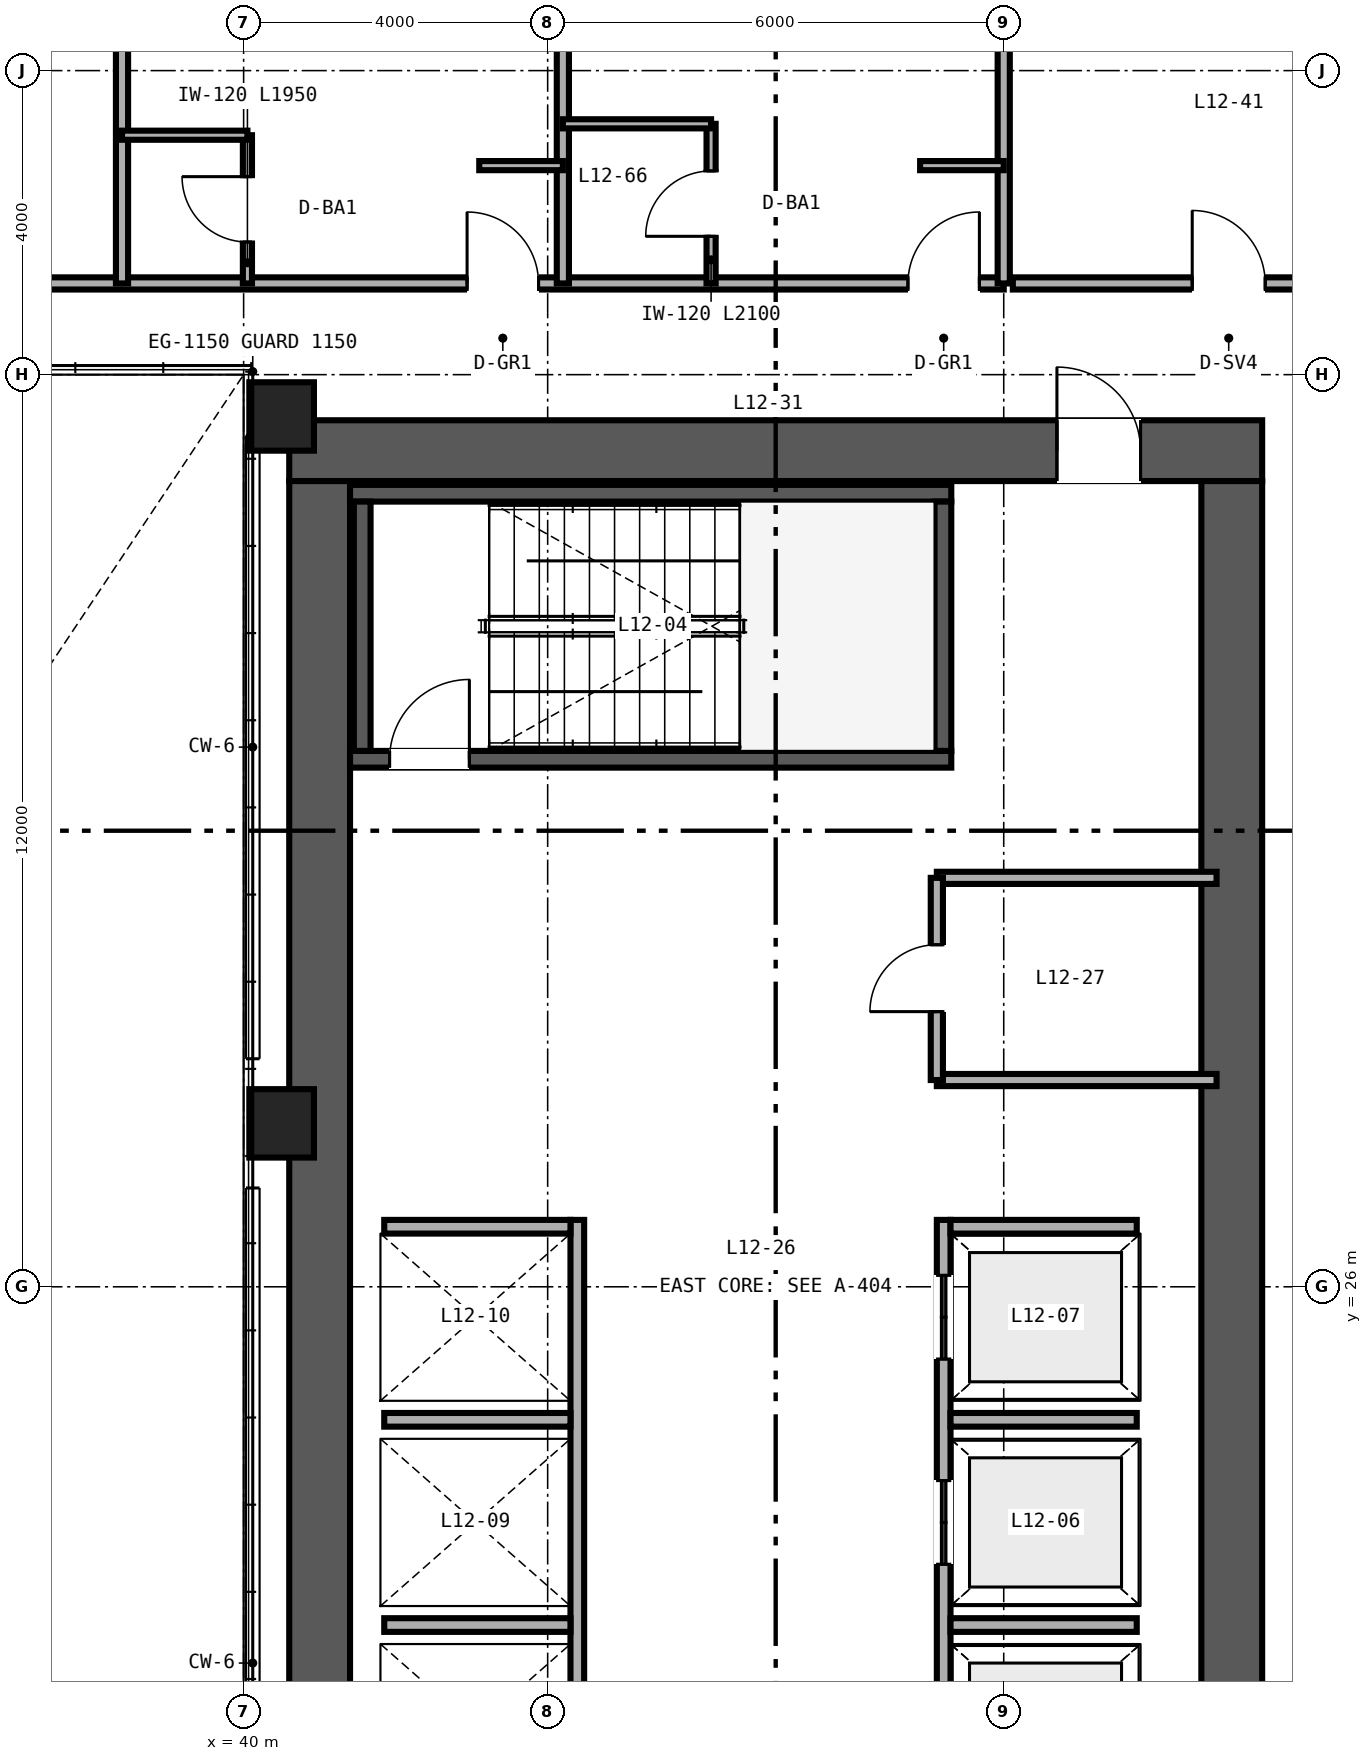
"""IFC4 building model, lengths in metres.
Left out: names, types, materials, properties, quantities, classifications, styles, units other than length and angle.
Written with IfcOpenShell. Run it as: python <this file> out.ifc"""

import sys

from ifc_helpers import new_model, si_unit, direction, frame, frame_2d, origin, origin_2d, place, context, subcontext, project, spatial, rectangle, hollow_rectangle, extrude, source, transform, mapped, element, fill, save


model = new_model("IFC4")
c1 = context("Model", 3, precision=1e-05, world=origin(), true_north=direction((0.0, 1.0)))
c2 = subcontext(c1, "Body", "Model", "MODEL_VIEW")
j1 = project(units=[si_unit("LENGTHUNIT", "METRE"), si_unit("PLANEANGLEUNIT", "RADIAN")], contexts=[c1])
p1 = place(None, origin())
s1 = spatial("IfcSite", under=j1, at=p1, CompositionType="ELEMENT")
p2 = place(p1, origin())
s2 = spatial("IfcBuilding", under=s1, at=p2, CompositionType="ELEMENT")
p3 = place(p2, frame((0.0, 0.0, 52.8)))
s3 = spatial("IfcBuildingStorey", under=s2, at=p3, CompositionType="ELEMENT", Elevation=52.8)
p4 = place(p3, frame((40.6, 37.0, 0.0), z_axis=(0.0, 0.0, 1.0), x_axis=(1.0, 0.0, 0.0)))
e1 = element("IfcWall", 1, at=p4, inside=s3, PredefinedType="SHEAR", context=c2, shape_type="SweptSolid", body=[
    extrude(rectangle(XDim=12.8, YDim=0.8, at=frame_2d((6.4, 0.0))), origin(), (0.0, 0.0, 1.0), 3.35),
])
p5 = place(p4, frame((10.1, 0.0, 0.0)))
e2 = element("IfcOpeningElement", 2, at=p5, cuts=e1, PredefinedType="OPENING", context=c2, shape_type="SweptSolid", body=[
    extrude(rectangle(XDim=1.1, YDim=2.15, at=frame_2d((0.55, 1.075))), frame((0.0, 0.41, 0.0), z_axis=(0.0, -1.0, 0.0), x_axis=(1.0, 0.0, 0.0)), (0.0, 0.0, 1.0), 0.82),
])
for number, where, z_axis, x_axis in (
    (3, (41.0, 15.4, 0.0), (0.0, 0.0, 1.0), (0.0, 1.0, 0.0)),
    (4, (53.0, 15.4, 0.0), (0.0, 0.0, 1.0), (0.0, 1.0, 0.0)),
):
    element("IfcWall", number, at=place(p3, frame(where, z_axis=z_axis, x_axis=x_axis)), inside=s3, PredefinedType="SHEAR", context=c2, shape_type="SweptSolid", body=[
        extrude(rectangle(XDim=21.2, YDim=0.8, at=frame_2d((10.6, 0.0))), origin(), (0.0, 0.0, 1.0), 3.35),
    ])
p6 = place(p3, frame((41.4, 32.94, 0.0), z_axis=(0.0, 0.0, 1.0), x_axis=(1.0, 0.0, 0.0)))
e5 = element("IfcWall", 5, at=p6, inside=s3, PredefinedType="SHEAR", context=c2, shape_type="SweptSolid", body=[
    extrude(rectangle(XDim=7.91, YDim=0.22, at=frame_2d((3.955, 0.0))), origin(), (0.0, 0.0, 1.0), 3.4),
])
p7 = place(p6, frame((0.52, 0.0, 0.0)))
e6 = element("IfcOpeningElement", 6, at=p7, cuts=e5, PredefinedType="OPENING", context=c2, shape_type="SweptSolid", body=[
    extrude(rectangle(XDim=1.05, YDim=2.15, at=frame_2d((0.525, 1.075))), frame((0.0, 0.12, 0.0), z_axis=(0.0, -1.0, 0.0), x_axis=(1.0, 0.0, 0.0)), (0.0, 0.0, 1.0), 0.24),
])
p8 = place(p3, frame((41.4, 36.44, 0.0), z_axis=(0.0, 0.0, 1.0), x_axis=(1.0, 0.0, 0.0)))
e7 = element("IfcWall", 7, at=p8, inside=s3, PredefinedType="SHEAR", context=c2, shape_type="SweptSolid", body=[
    extrude(rectangle(XDim=7.91, YDim=0.22, at=frame_2d((3.955, 0.0))), origin(), (0.0, 0.0, 1.0), 3.4),
])
for number, where, z_axis, x_axis in (
    (8, (41.56, 33.05, 0.0), (0.0, 0.0, 1.0), (0.0, 1.0, 0.0)),
    (9, (49.2, 33.05, 0.0), (0.0, 0.0, 1.0), (0.0, 1.0, 0.0)),
):
    element("IfcWall", number, at=place(p3, frame(where, z_axis=z_axis, x_axis=x_axis)), inside=s3, PredefinedType="SHEAR", context=c2, shape_type="SweptSolid", body=[
        extrude(rectangle(XDim=3.28, YDim=0.22, at=frame_2d((1.64, 0.0))), origin(), (0.0, 0.0, 1.0), 3.4),
    ])
m1 = source(origin(), c2, "Body", "SweptSolid", [
    extrude(hollow_rectangle(XDim=0.85, YDim=0.9, WallThickness=0.04, at=origin_2d()), origin(), (0.0, 0.0, 1.0), 3.35),
])
for number, where, z_axis, x_axis in (
    (10, (40.5, 28.15, 0.0), (0.0, 0.0, 1.0), (1.0, 0.0, 0.0)),
    (11, (40.5, 37.45, 0.0), (0.0, 0.0, 1.0), (1.0, 0.0, 0.0)),
):
    element("IfcColumn", number, at=place(p3, frame(where, z_axis=z_axis, x_axis=x_axis)), inside=s3, PredefinedType="COLUMN", context=c2, shape_type="MappedRepresentation", body=[
        mapped(m1, transform((0.0, 0.0, 0.0), scale=1.0)),
    ])
p9 = place(p3, frame((49.21, 18.92, 0.0), z_axis=(0.0, 0.0, 1.0), x_axis=(0.0, 1.0, 0.0)))
e12 = element("IfcWall", 12, at=p9, inside=s3, PredefinedType="SOLIDWALL", context=c2, shape_type="SweptSolid", body=[
    extrude(rectangle(XDim=7.96, YDim=0.18, at=frame_2d((3.98, 0.0))), origin(), (0.0, 0.0, 1.0), 3.35),
])
p10 = place(p9, frame((0.73, 0.0, 0.0)))
e13 = element("IfcOpeningElement", 13, at=p10, cuts=e12, PredefinedType="OPENING", context=c2, shape_type="SweptSolid", body=[
    extrude(rectangle(XDim=1.1, YDim=2.2, at=frame_2d((0.55, 1.1))), frame((0.0, 0.1, 0.0), z_axis=(0.0, -1.0, 0.0), x_axis=(1.0, 0.0, 0.0)), (0.0, 0.0, 1.0), 0.2),
])
p11 = place(p9, frame((3.43, 0.0, 0.0)))
e14 = element("IfcOpeningElement", 14, at=p11, cuts=e12, PredefinedType="OPENING", context=c2, shape_type="SweptSolid", body=[
    extrude(rectangle(XDim=1.1, YDim=2.2, at=frame_2d((0.55, 1.1))), frame((0.0, 0.1, 0.0), z_axis=(0.0, -1.0, 0.0), x_axis=(1.0, 0.0, 0.0)), (0.0, 0.0, 1.0), 0.2),
])
p12 = place(p9, frame((6.13, 0.0, 0.0)))
e15 = element("IfcOpeningElement", 15, at=p12, cuts=e12, PredefinedType="OPENING", context=c2, shape_type="SweptSolid", body=[
    extrude(rectangle(XDim=1.1, YDim=2.2, at=frame_2d((0.55, 1.1))), frame((0.0, 0.1, 0.0), z_axis=(0.0, -1.0, 0.0), x_axis=(1.0, 0.0, 0.0)), (0.0, 0.0, 1.0), 0.2),
])
for number, where, z_axis, x_axis in (
    (16, (49.3, 26.79, 0.0), (0.0, 0.0, 1.0), (1.0, 0.0, 0.0)),
    (17, (49.3, 21.55, 0.0), (0.0, 0.0, 1.0), (1.0, 0.0, 0.0)),
    (18, (49.3, 24.25, 0.0), (0.0, 0.0, 1.0), (1.0, 0.0, 0.0)),
):
    element("IfcWall", number, at=place(p3, frame(where, z_axis=z_axis, x_axis=x_axis)), inside=s3, PredefinedType="SOLIDWALL", context=c2, shape_type="SweptSolid", body=[
        extrude(rectangle(XDim=2.45, YDim=0.18, at=frame_2d((1.225, 0.0))), origin(), (0.0, 0.0, 1.0), 3.35),
    ])
p13 = place(p3, frame((44.39, 18.92, 0.0), z_axis=(0.0, 0.0, 1.0), x_axis=(0.0, 1.0, 0.0)))
e19 = element("IfcWall", 19, at=p13, inside=s3, PredefinedType="SOLIDWALL", context=c2, shape_type="SweptSolid", body=[
    extrude(rectangle(XDim=7.96, YDim=0.18, at=frame_2d((3.98, 0.0))), origin(), (0.0, 0.0, 1.0), 3.35),
])
for number, where, z_axis, x_axis in (
    (20, (41.85, 26.79, 0.0), (0.0, 0.0, 1.0), (1.0, 0.0, 0.0)),
    (21, (41.85, 21.55, 0.0), (0.0, 0.0, 1.0), (1.0, 0.0, 0.0)),
    (22, (41.85, 24.25, 0.0), (0.0, 0.0, 1.0), (1.0, 0.0, 0.0)),
):
    element("IfcWall", number, at=place(p3, frame(where, z_axis=z_axis, x_axis=x_axis)), inside=s3, PredefinedType="SOLIDWALL", context=c2, shape_type="SweptSolid", body=[
        extrude(rectangle(XDim=2.45, YDim=0.18, at=frame_2d((1.225, 0.0))), origin(), (0.0, 0.0, 1.0), 3.35),
    ])
p14 = place(p3, frame((49.12, 28.72, 0.0), z_axis=(0.0, 0.0, 1.0), x_axis=(1.0, 0.0, 0.0)))
e23 = element("IfcWall", 23, at=p14, inside=s3, PredefinedType="PARTITIONING", context=c2, shape_type="SweptSolid", body=[
    extrude(rectangle(XDim=3.68, YDim=0.16, at=frame_2d((1.84, 0.0))), origin(), (0.0, 0.0, 1.0), 3.35),
])
p15 = place(p3, frame((49.12, 31.38, 0.0), z_axis=(0.0, 0.0, 1.0), x_axis=(1.0, 0.0, 0.0)))
e24 = element("IfcWall", 24, at=p15, inside=s3, PredefinedType="PARTITIONING", context=c2, shape_type="SweptSolid", body=[
    extrude(rectangle(XDim=3.68, YDim=0.16, at=frame_2d((1.84, 0.0))), origin(), (0.0, 0.0, 1.0), 2.36),
])
p16 = place(p3, frame((49.12, 28.72, 0.0), z_axis=(0.0, 0.0, 1.0), x_axis=(0.0, 1.0, 0.0)))
e25 = element("IfcWall", 25, at=p16, inside=s3, PredefinedType="PARTITIONING", context=c2, shape_type="SweptSolid", body=[
    extrude(rectangle(XDim=2.66, YDim=0.16, at=frame_2d((1.33, 0.0))), origin(), (0.0, 0.0, 1.0), 2.36),
])
p17 = place(p16, frame((0.9, 0.0, 0.0)))
e26 = element("IfcOpeningElement", 26, at=p17, cuts=e25, PredefinedType="OPENING", context=c2, shape_type="SweptSolid", body=[
    extrude(rectangle(XDim=0.88, YDim=2.15, at=frame_2d((0.44, 1.075))), frame((0.0, 0.09, 0.0), z_axis=(0.0, -1.0, 0.0), x_axis=(1.0, 0.0, 0.0)), (0.0, 0.0, 1.0), 0.18),
])
p18 = place(p3, frame((50.12, 39.2, 0.0), z_axis=(0.0, 0.0, 1.0), x_axis=(1.0, 0.0, 0.0)))
e27 = element("IfcWall", 27, at=p18, inside=s3, PredefinedType="PARTITIONING", context=c2, shape_type="SweptSolid", body=[
    extrude(rectangle(XDim=5.68, YDim=0.16, at=frame_2d((2.84, 0.0))), origin(), (0.0, 0.0, 1.0), 3.35),
])
p19 = place(p18, frame((2.36, 0.0, 0.0)))
e28 = element("IfcOpeningElement", 28, at=p19, cuts=e27, PredefinedType="OPENING", context=c2, shape_type="SweptSolid", body=[
    extrude(rectangle(XDim=0.96, YDim=2.15, at=frame_2d((0.48, 1.075))), frame((0.0, 0.09, 0.0), z_axis=(0.0, -1.0, 0.0), x_axis=(1.0, 0.0, 0.0)), (0.0, 0.0, 1.0), 0.18),
])
p20 = place(p3, frame((14.0, 39.2, 0.0), z_axis=(0.0, 0.0, 1.0), x_axis=(1.0, 0.0, 0.0)))
e29 = element("IfcWall", 29, at=p20, inside=s3, PredefinedType="PARTITIONING", context=c2, shape_type="SweptSolid", body=[
    extrude(rectangle(XDim=36.0, YDim=0.16, at=frame_2d((18.0, 0.0))), origin(), (0.0, 0.0, 1.0), 2.571),
])
p21 = place(p20, frame((4.54, 0.0, 0.0)))
e30 = element("IfcOpeningElement", 30, at=p21, cuts=e29, PredefinedType="OPENING", context=c2, shape_type="SweptSolid", body=[
    extrude(rectangle(XDim=0.94, YDim=2.15, at=frame_2d((0.47, 1.075))), frame((0.0, 0.09, 0.0), z_axis=(0.0, -1.0, 0.0), x_axis=(1.0, 0.0, 0.0)), (0.0, 0.0, 1.0), 0.18),
])
p22 = place(p20, frame((10.29, 0.0, 0.0)))
e31 = element("IfcOpeningElement", 31, at=p22, cuts=e29, PredefinedType="OPENING", context=c2, shape_type="SweptSolid", body=[
    extrude(rectangle(XDim=0.94, YDim=2.15, at=frame_2d((0.47, 1.075))), frame((0.0, 0.09, 0.0), z_axis=(0.0, -1.0, 0.0), x_axis=(1.0, 0.0, 0.0)), (0.0, 0.0, 1.0), 0.18),
])
p23 = place(p20, frame((16.54, 0.0, 0.0)))
e32 = element("IfcOpeningElement", 32, at=p23, cuts=e29, PredefinedType="OPENING", context=c2, shape_type="SweptSolid", body=[
    extrude(rectangle(XDim=0.94, YDim=2.15, at=frame_2d((0.47, 1.075))), frame((0.0, 0.09, 0.0), z_axis=(0.0, -1.0, 0.0), x_axis=(1.0, 0.0, 0.0)), (0.0, 0.0, 1.0), 0.18),
])
p24 = place(p20, frame((20.62, 0.0, 0.0)))
e33 = element("IfcOpeningElement", 33, at=p24, cuts=e29, PredefinedType="OPENING", context=c2, shape_type="SweptSolid", body=[
    extrude(rectangle(XDim=0.96, YDim=2.15, at=frame_2d((0.48, 1.075))), frame((0.0, 0.09, 0.0), z_axis=(0.0, -1.0, 0.0), x_axis=(1.0, 0.0, 0.0)), (0.0, 0.0, 1.0), 0.18),
])
p25 = place(p20, frame((28.94, 0.0, 0.0)))
e34 = element("IfcOpeningElement", 34, at=p25, cuts=e29, PredefinedType="OPENING", context=c2, shape_type="SweptSolid", body=[
    extrude(rectangle(XDim=0.94, YDim=2.15, at=frame_2d((0.47, 1.075))), frame((0.0, 0.09, 0.0), z_axis=(0.0, -1.0, 0.0), x_axis=(1.0, 0.0, 0.0)), (0.0, 0.0, 1.0), 0.18),
])
p26 = place(p20, frame((34.74, 0.0, 0.0)))
e35 = element("IfcOpeningElement", 35, at=p26, cuts=e29, PredefinedType="OPENING", context=c2, shape_type="SweptSolid", body=[
    extrude(rectangle(XDim=0.94, YDim=2.15, at=frame_2d((0.47, 1.075))), frame((0.0, 0.09, 0.0), z_axis=(0.0, -1.0, 0.0), x_axis=(1.0, 0.0, 0.0)), (0.0, 0.0, 1.0), 0.18),
])
p27 = place(p3, frame((50.0, 39.2, 0.0), z_axis=(0.0, 0.0, 1.0), x_axis=(0.0, 1.0, 0.0)))
e36 = element("IfcWall", 36, at=p27, inside=s3, PredefinedType="PARTITIONING", context=c2, shape_type="SweptSolid", body=[
    extrude(rectangle(XDim=10.44, YDim=0.16, at=frame_2d((5.22, 0.0))), origin(), (0.0, 0.0, 1.0), 2.657),
])
p28 = place(p3, frame((38.4, 39.2, 0.0), z_axis=(0.0, 0.0, 1.0), x_axis=(0.0, 1.0, 0.0)))
e37 = element("IfcWall", 37, at=p28, inside=s3, PredefinedType="PARTITIONING", context=c2, shape_type="SweptSolid", body=[
    extrude(rectangle(XDim=10.44, YDim=0.16, at=frame_2d((5.22, 0.0))), origin(), (0.0, 0.0, 1.0), 2.423),
])
p29 = place(p3, frame((44.2, 39.2, 0.0), z_axis=(0.0, 0.0, 1.0), x_axis=(0.0, 1.0, 0.0)))
e38 = element("IfcWall", 38, at=p29, inside=s3, PredefinedType="PARTITIONING", context=c2, shape_type="SweptSolid", body=[
    extrude(rectangle(XDim=10.44, YDim=0.16, at=frame_2d((5.22, 0.0))), origin(), (0.0, 0.0, 1.0), 2.657),
])
p30 = place(p3, frame((40.05, 39.2, 0.0), z_axis=(0.0, 0.0, 1.0), x_axis=(0.0, 1.0, 0.0)))
e39 = element("IfcWall", 39, at=p30, inside=s3, PredefinedType="PARTITIONING", context=c2, shape_type="SweptSolid", body=[
    extrude(rectangle(XDim=1.95, YDim=0.12, at=frame_2d((0.975, 0.0))), origin(), (0.0, 0.0, 1.0), 3.35),
])
p31 = place(p30, frame((0.545, 0.0, 0.0)))
e40 = element("IfcOpeningElement", 40, at=p31, cuts=e39, PredefinedType="OPENING", context=c2, shape_type="SweptSolid", body=[
    extrude(rectangle(XDim=0.86, YDim=2.1, at=frame_2d((0.43, 1.05))), frame((0.0, 0.07, 0.0), z_axis=(0.0, -1.0, 0.0), x_axis=(1.0, 0.0, 0.0)), (0.0, 0.0, 1.0), 0.14),
])
p32 = place(p3, frame((38.4, 41.15, 0.0), z_axis=(0.0, 0.0, 1.0), x_axis=(1.0, 0.0, 0.0)))
e41 = element("IfcWall", 41, at=p32, inside=s3, PredefinedType="PARTITIONING", context=c2, shape_type="SweptSolid", body=[
    extrude(rectangle(XDim=1.65, YDim=0.12, at=frame_2d((0.825, 0.0))), origin(), (0.0, 0.0, 1.0), 3.35),
])
p33 = place(p3, frame((43.1, 40.75, 0.0), z_axis=(0.0, 0.0, 1.0), x_axis=(1.0, 0.0, 0.0)))
e42 = element("IfcWall", 42, at=p33, inside=s3, PredefinedType="PARTITIONING", context=c2, shape_type="SweptSolid", body=[
    extrude(rectangle(XDim=1.1, YDim=0.12, at=frame_2d((0.55, 0.0))), origin(), (0.0, 0.0, 1.0), 3.35),
])
p34 = place(p3, frame((46.15, 39.2, 0.0), z_axis=(0.0, 0.0, 1.0), x_axis=(0.0, 1.0, 0.0)))
e43 = element("IfcWall", 43, at=p34, inside=s3, PredefinedType="PARTITIONING", context=c2, shape_type="SweptSolid", body=[
    extrude(rectangle(XDim=2.1, YDim=0.12, at=frame_2d((1.05, 0.0))), origin(), (0.0, 0.0, 1.0), 3.35),
])
p35 = place(p34, frame((0.62, 0.0, 0.0)))
e44 = element("IfcOpeningElement", 44, at=p35, cuts=e43, PredefinedType="OPENING", context=c2, shape_type="SweptSolid", body=[
    extrude(rectangle(XDim=0.86, YDim=2.1, at=frame_2d((0.43, 1.05))), frame((0.0, 0.07, 0.0), z_axis=(0.0, -1.0, 0.0), x_axis=(1.0, 0.0, 0.0)), (0.0, 0.0, 1.0), 0.14),
])
p36 = place(p3, frame((44.2, 41.3, 0.0), z_axis=(0.0, 0.0, 1.0), x_axis=(1.0, 0.0, 0.0)))
e45 = element("IfcWall", 45, at=p36, inside=s3, PredefinedType="PARTITIONING", context=c2, shape_type="SweptSolid", body=[
    extrude(rectangle(XDim=1.95, YDim=0.12, at=frame_2d((0.975, 0.0))), origin(), (0.0, 0.0, 1.0), 3.35),
])
p37 = place(p3, frame((48.9, 40.75, 0.0), z_axis=(0.0, 0.0, 1.0), x_axis=(1.0, 0.0, 0.0)))
e46 = element("IfcWall", 46, at=p37, inside=s3, PredefinedType="PARTITIONING", context=c2, shape_type="SweptSolid", body=[
    extrude(rectangle(XDim=1.1, YDim=0.12, at=frame_2d((0.55, 0.0))), origin(), (0.0, 0.0, 1.0), 3.35),
])
m2 = source(origin(), c2, "Body", "SweptSolid", [
    extrude(rectangle(XDim=1.05, YDim=2.15, at=frame_2d((0.525, 1.075))), frame((0.0, 0.025, 0.0), z_axis=(0.0, -1.0, 0.0), x_axis=(1.0, 0.0, 0.0)), (0.0, 0.0, 1.0), 0.05),
])
p38 = place(p7, origin())
e47 = element("IfcDoor", 47, at=p38, inside=s3, OperationType="SINGLE_SWING_RIGHT", PredefinedType="DOOR", context=c2, shape_type="MappedRepresentation", body=[
    mapped(m2, transform((0.0, 0.0, 0.0), scale=1.0)),
])
fill(e6, e47)
m3 = source(origin(), c2, "Body", "SweptSolid", [
    extrude(rectangle(XDim=1.1, YDim=2.2, at=frame_2d((0.55, 1.1))), frame((0.0, 0.025, 0.0), z_axis=(0.0, -1.0, 0.0), x_axis=(1.0, 0.0, 0.0)), (0.0, 0.0, 1.0), 0.05),
])
p39 = place(p11, origin())
e48 = element("IfcDoor", 48, at=p39, inside=s3, OperationType="DOUBLE_DOOR_SLIDING", PredefinedType="DOOR", context=c2, shape_type="MappedRepresentation", body=[
    mapped(m3, transform((0.0, 0.0, 0.0), scale=1.0)),
])
fill(e14, e48)
p40 = place(p12, origin())
e49 = element("IfcDoor", 49, at=p40, inside=s3, OperationType="DOUBLE_DOOR_SLIDING", PredefinedType="DOOR", context=c2, shape_type="MappedRepresentation", body=[
    mapped(m3, transform((0.0, 0.0, 0.0), scale=1.0)),
])
fill(e15, e49)
m4 = source(origin(), c2, "Body", "SweptSolid", [
    extrude(rectangle(XDim=1.1, YDim=2.15, at=frame_2d((0.55, 1.075))), frame((0.0, 0.025, 0.0), z_axis=(0.0, -1.0, 0.0), x_axis=(1.0, 0.0, 0.0)), (0.0, 0.0, 1.0), 0.05),
])
p41 = place(p5, origin())
e50 = element("IfcDoor", 50, at=p41, inside=s3, OperationType="SINGLE_SWING_LEFT", PredefinedType="DOOR", context=c2, shape_type="MappedRepresentation", body=[
    mapped(m4, transform((0.0, 0.0, 0.0), scale=1.0)),
])
fill(e2, e50)
m5 = source(origin(), c2, "Body", "SweptSolid", [
    extrude(rectangle(XDim=0.88, YDim=2.15, at=frame_2d((0.44, 1.075))), frame((0.0, 0.025, 0.0), z_axis=(0.0, -1.0, 0.0), x_axis=(1.0, 0.0, 0.0)), (0.0, 0.0, 1.0), 0.05),
])
p42 = place(p17, origin())
e51 = element("IfcDoor", 51, at=p42, inside=s3, OperationType="SINGLE_SWING_LEFT", PredefinedType="DOOR", context=c2, shape_type="MappedRepresentation", body=[
    mapped(m5, transform((0.0, 0.0, 0.0), scale=1.0)),
])
fill(e26, e51)
m6 = source(origin(), c2, "Body", "SweptSolid", [
    extrude(rectangle(XDim=0.96, YDim=2.15, at=frame_2d((0.48, 1.075))), frame((0.0, 0.025, 0.0), z_axis=(0.0, -1.0, 0.0), x_axis=(1.0, 0.0, 0.0)), (0.0, 0.0, 1.0), 0.05),
])
p43 = place(p19, origin())
e52 = element("IfcDoor", 52, at=p43, inside=s3, OperationType="SINGLE_SWING_LEFT", PredefinedType="DOOR", context=c2, shape_type="MappedRepresentation", body=[
    mapped(m6, transform((0.0, 0.0, 0.0), scale=1.0)),
])
fill(e28, e52)
m7 = source(origin(), c2, "Body", "SweptSolid", [
    extrude(rectangle(XDim=0.86, YDim=2.1, at=frame_2d((0.43, 1.05))), frame((0.0, 0.025, 0.0), z_axis=(0.0, -1.0, 0.0), x_axis=(1.0, 0.0, 0.0)), (0.0, 0.0, 1.0), 0.05),
])
p44 = place(p31, origin())
e53 = element("IfcDoor", 53, at=p44, inside=s3, OperationType="SINGLE_SWING_RIGHT", PredefinedType="DOOR", context=c2, shape_type="MappedRepresentation", body=[
    mapped(m7, transform((0.0, 0.0, 0.0), scale=1.0)),
])
fill(e40, e53)
p45 = place(p35, origin())
e54 = element("IfcDoor", 54, at=p45, inside=s3, OperationType="SINGLE_SWING_LEFT", PredefinedType="DOOR", context=c2, shape_type="MappedRepresentation", body=[
    mapped(m7, transform((0.0, 0.0, 0.0), scale=1.0)),
])
fill(e44, e54)
m8 = source(origin(), c2, "Body", "SweptSolid", [
    extrude(rectangle(XDim=0.94, YDim=2.15, at=frame_2d((0.47, 1.075))), frame((0.0, 0.025, 0.0), z_axis=(0.0, -1.0, 0.0), x_axis=(1.0, 0.0, 0.0)), (0.0, 0.0, 1.0), 0.05),
])
p46 = place(p25, origin())
e55 = element("IfcDoor", 55, at=p46, inside=s3, OperationType="SINGLE_SWING_LEFT", PredefinedType="DOOR", context=c2, shape_type="MappedRepresentation", body=[
    mapped(m8, transform((0.0, 0.0, 0.0), scale=1.0)),
])
fill(e34, e55)
p47 = place(p26, origin())
e56 = element("IfcDoor", 56, at=p47, inside=s3, OperationType="SINGLE_SWING_RIGHT", PredefinedType="DOOR", context=c2, shape_type="MappedRepresentation", body=[
    mapped(m8, transform((0.0, 0.0, 0.0), scale=1.0)),
])
fill(e35, e56)
save(model, sys.argv[1])
